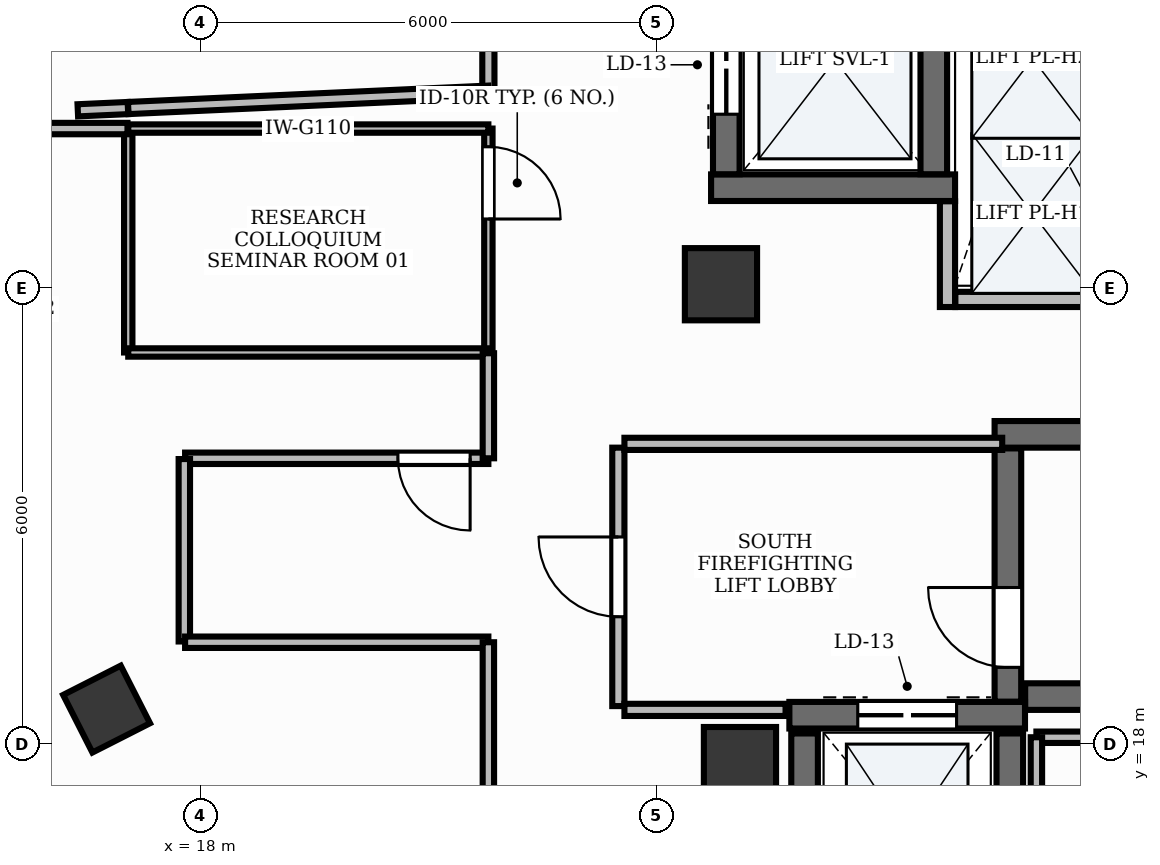
"""IFC4 building model, lengths in metres.
Left out: names, types, materials, properties, quantities, classifications, styles, units other than length and angle.
Written with IfcOpenShell. Run it as: python <this file> out.ifc"""

import sys

from ifc_helpers import new_model, si_unit, direction, frame, frame_2d, origin, origin_2d, place, context, subcontext, project, spatial, rectangle, extrude, element, fill, save


model = new_model("IFC4")
c1 = context("Model", 3, precision=1e-05, world=origin(), true_north=direction((0.0, 1.0)))
c2 = subcontext(c1, "Body", "Model", "MODEL_VIEW")
j1 = project(units=[si_unit("LENGTHUNIT", "METRE"), si_unit("PLANEANGLEUNIT", "RADIAN")], contexts=[c1])
p1 = place(None, origin())
s1 = spatial("IfcSite", under=j1, at=p1, CompositionType="ELEMENT")
p2 = place(p1, origin())
s2 = spatial("IfcBuilding", under=s1, at=p2, CompositionType="ELEMENT")
p3 = place(p2, frame((0.0, 0.0, 310.2)))
s3 = spatial("IfcBuildingStorey", under=s2, at=p3, CompositionType="ELEMENT", Elevation=310.2)
p4 = place(p3, frame((28.852, 18.625, 0.0), z_axis=(0.0, 0.0, 1.0), x_axis=(1.0, 0.0, 0.0)))
e1 = element("IfcWall", 1, at=p4, inside=s3, PredefinedType="SHEAR", context=c2, shape_type="SweptSolid", body=[
    extrude(rectangle(XDim=8.148, YDim=0.35, at=frame_2d((4.074, 0.0))), origin(), (0.0, 0.0, 1.0), 3.9),
])
p5 = place(p3, frame((28.45, 22.075, 0.0), z_axis=(0.0, 0.0, 1.0), x_axis=(1.0, 0.0, 0.0)))
e2 = element("IfcWall", 2, at=p5, inside=s3, PredefinedType="SHEAR", context=c2, shape_type="SweptSolid", body=[
    extrude(rectangle(XDim=8.55, YDim=0.35, at=frame_2d((4.275, 0.0))), origin(), (0.0, 0.0, 1.0), 3.9),
])
p6 = place(p3, frame((28.625, 18.557, 0.0), z_axis=(0.0, 0.0, 1.0), x_axis=(0.0, 1.0, 0.0)))
e3 = element("IfcWall", 3, at=p6, inside=s3, PredefinedType="SHEAR", context=c2, shape_type="SweptSolid", body=[
    extrude(rectangle(XDim=3.333, YDim=0.35, at=frame_2d((1.667, 0.0))), origin(), (0.0, 0.0, 1.0), 3.9),
])
p7 = place(p6, frame((0.453, 0.0, 0.0)))
e4 = element("IfcOpeningElement", 4, at=p7, cuts=e3, PredefinedType="OPENING", context=c2, shape_type="SweptSolid", body=[
    extrude(rectangle(XDim=1.05, YDim=2.15, at=frame_2d((0.525, 1.075))), frame((0.0, 0.19, 0.0), z_axis=(0.0, -1.0, 0.0), x_axis=(1.0, 0.0, 0.0)), (0.0, 0.0, 1.0), 0.38),
])
p8 = place(p3, frame((25.75, 18.38, 0.0), z_axis=(0.0, 0.0, 1.0), x_axis=(1.0, 0.0, 0.0)))
e5 = element("IfcWall", 5, at=p8, inside=s3, PredefinedType="SHEAR", context=c2, shape_type="SweptSolid", body=[
    extrude(rectangle(XDim=3.1, YDim=0.35, at=frame_2d((1.55, 0.0))), origin(), (0.0, 0.0, 1.0), 3.9),
])
p9 = place(p8, frame((0.9, 0.0, 0.0)))
e6 = element("IfcOpeningElement", 6, at=p9, cuts=e5, PredefinedType="OPENING", context=c2, shape_type="SweptSolid", body=[
    extrude(rectangle(XDim=1.3, YDim=2.2, at=frame_2d((0.65, 1.1))), frame((0.0, 0.19, 0.0), z_axis=(0.0, -1.0, 0.0), x_axis=(1.0, 0.0, 0.0)), (0.0, 0.0, 1.0), 0.38),
])
for number, where, z_axis, x_axis in (
    (7, (25.95, 15.44, 0.0), (0.0, 0.0, 1.0), (0.0, 1.0, 0.0)),
    (8, (28.65, 15.44, 0.0), (0.0, 0.0, 1.0), (0.0, 1.0, 0.0)),
):
    element("IfcWall", number, at=place(p3, frame(where, z_axis=z_axis, x_axis=x_axis)), inside=s3, PredefinedType="SHEAR", context=c2, shape_type="SweptSolid", body=[
        extrude(rectangle(XDim=2.7, YDim=0.35, at=frame_2d((1.35, 0.0))), origin(), (0.0, 0.0, 1.0), 3.9),
    ])
p10 = place(p3, frame((24.72, 25.32, 0.0), z_axis=(0.0, 0.0, 1.0), x_axis=(1.0, 0.0, 0.0)))
e9 = element("IfcWall", 9, at=p10, inside=s3, PredefinedType="SHEAR", context=c2, shape_type="SweptSolid", body=[
    extrude(rectangle(XDim=3.21, YDim=0.35, at=frame_2d((1.605, 0.0))), origin(), (0.0, 0.0, 1.0), 3.9),
])
p11 = place(p3, frame((24.92, 25.497, 0.0), z_axis=(0.0, 0.0, 1.0), x_axis=(0.0, 1.0, 0.0)))
e10 = element("IfcWall", 10, at=p11, inside=s3, PredefinedType="SHEAR", context=c2, shape_type="SweptSolid", body=[
    extrude(rectangle(XDim=3.006, YDim=0.35, at=frame_2d((1.503, 0.0))), origin(), (0.0, 0.0, 1.0), 3.9),
])
p12 = place(p11, frame((0.79, 0.0, 0.0)))
e11 = element("IfcOpeningElement", 11, at=p12, cuts=e10, PredefinedType="OPENING", context=c2, shape_type="SweptSolid", body=[
    extrude(rectangle(XDim=1.3, YDim=2.2, at=frame_2d((0.65, 1.1))), frame((0.0, 0.19, 0.0), z_axis=(0.0, -1.0, 0.0), x_axis=(1.0, 0.0, 0.0)), (0.0, 0.0, 1.0), 0.38),
])
p13 = place(p3, frame((27.65, 25.497, 0.0), z_axis=(0.0, 0.0, 1.0), x_axis=(0.0, 1.0, 0.0)))
e12 = element("IfcWall", 12, at=p13, inside=s3, PredefinedType="SHEAR", context=c2, shape_type="SweptSolid", body=[
    extrude(rectangle(XDim=3.006, YDim=0.35, at=frame_2d((1.503, 0.0))), origin(), (0.0, 0.0, 1.0), 3.9),
])
for number, where, z_axis, x_axis in (
    (13, (24.85, 24.05, -0.0), (0.0, 0.0, 1.0), (1.0, 0.0, 0.0)),
    (14, (25.1, 17.75, -0.0), (0.0, 0.0, 1.0), (1.0, 0.0, 0.0)),
):
    element("IfcColumn", number, at=place(p3, frame(where, z_axis=z_axis, x_axis=x_axis)), inside=s3, PredefinedType="PILASTER", context=c2, shape_type="SweptSolid", body=[
        extrude(rectangle(XDim=0.95, YDim=0.95, at=origin_2d()), origin(), (0.0, 0.0, 1.0), 3.901),
    ])
p14 = place(p3, frame((16.767, 18.46, -0.0), z_axis=(0.0, 0.0, 1.0), x_axis=(-0.453057191132, 0.891481453292, 0.0)))
e15 = element("IfcColumn", 15, at=p14, inside=s3, PredefinedType="COLUMN", context=c2, shape_type="SweptSolid", body=[
    extrude(rectangle(XDim=0.85, YDim=0.85, at=origin_2d()), origin(), (0.0, 0.0, 1.0), 3.901),
])
p15 = place(p3, frame((13.598, 20.73, 0.0), z_axis=(0.0, 0.0, 1.0), x_axis=(0.546723072071, -0.837313491152, 0.0)))
e16 = element("IfcWall", 16, at=p15, inside=s3, PredefinedType="STANDARD", context=c2, shape_type="SweptSolid", body=[
    extrude(rectangle(XDim=4.775, YDim=0.3, at=frame_2d((2.388, 0.0))), origin(), (0.0, 0.0, 1.0), 3.9),
])
p16 = place(p3, frame((27.83, 23.75, 0.0), z_axis=(0.0, 0.0, 1.0), x_axis=(0.0, 1.0, 0.0)))
e17 = element("IfcWall", 17, at=p16, inside=s3, PredefinedType="PARTITIONING", context=c2, shape_type="SweptSolid", body=[
    extrude(rectangle(XDim=1.391, YDim=0.2, at=frame_2d((0.696, 0.0))), origin(), (0.0, 0.0, 1.0), 2.91),
])
p17 = place(p3, frame((27.934, 23.85, 0.0), z_axis=(0.0, 0.0, 1.0), x_axis=(1.0, 0.0, 0.0)))
e18 = element("IfcWall", 18, at=p17, inside=s3, PredefinedType="PARTITIONING", context=c2, shape_type="SweptSolid", body=[
    extrude(rectangle(XDim=2.096, YDim=0.2, at=frame_2d((1.048, 0.0))), origin(), (0.0, 0.0, 1.0), 2.91),
])
p18 = place(p3, frame((23.5, 18.5, 0.0), z_axis=(0.0, 0.0, 1.0), x_axis=(0.0, 1.0, 0.0)))
e19 = element("IfcWall", 19, at=p18, inside=s3, PredefinedType="PARTITIONING", context=c2, shape_type="SweptSolid", body=[
    extrude(rectangle(XDim=3.4, YDim=0.16, at=frame_2d((1.7, 0.0))), origin(), (0.0, 0.0, 1.0), 2.91),
])
p19 = place(p18, frame((1.175, 0.0, 0.0)))
e20 = element("IfcOpeningElement", 20, at=p19, cuts=e19, PredefinedType="OPENING", context=c2, shape_type="SweptSolid", body=[
    extrude(rectangle(XDim=1.05, YDim=2.15, at=frame_2d((0.525, 1.075))), frame((0.0, 0.095, 0.0), z_axis=(0.0, -1.0, 0.0), x_axis=(1.0, 0.0, 0.0)), (0.0, 0.0, 1.0), 0.19),
])
p20 = place(p3, frame((23.58, 21.95, 0.0), z_axis=(0.0, 0.0, 1.0), x_axis=(1.0, 0.0, 0.0)))
e21 = element("IfcWall", 21, at=p20, inside=s3, PredefinedType="PARTITIONING", context=c2, shape_type="SweptSolid", body=[
    extrude(rectangle(XDim=4.97, YDim=0.16, at=frame_2d((2.485, 0.0))), origin(), (0.0, 0.0, 1.0), 2.91),
])
p21 = place(p3, frame((23.58, 18.45, 0.0), z_axis=(0.0, 0.0, 1.0), x_axis=(1.0, 0.0, 0.0)))
e22 = element("IfcWall", 22, at=p21, inside=s3, PredefinedType="PARTITIONING", context=c2, shape_type="SweptSolid", body=[
    extrude(rectangle(XDim=2.12, YDim=0.16, at=frame_2d((1.06, 0.0))), origin(), (0.0, 0.0, 1.0), 2.91),
])
p22 = place(p3, frame((21.79, 26.098, 0.0), z_axis=(0.0, 0.0, 1.0), x_axis=(0.0, -1.0, 0.0)))
e23 = element("IfcWall", 23, at=p22, inside=s3, PredefinedType="MOVABLE", context=c2, shape_type="SweptSolid", body=[
    extrude(rectangle(XDim=2.946, YDim=0.11, at=frame_2d((1.473, 0.0))), origin(), (0.0, 0.0, 1.0), 2.91),
])
p23 = place(p22, frame((0.24, 0.0, 0.0)))
e24 = element("IfcOpeningElement", 24, at=p23, cuts=e23, PredefinedType="OPENING", context=c2, shape_type="SweptSolid", body=[
    extrude(rectangle(XDim=0.95, YDim=2.15, at=frame_2d((0.475, 1.075))), frame((0.0, 0.07, 0.0), z_axis=(0.0, -1.0, 0.0), x_axis=(1.0, 0.0, 0.0)), (0.0, 0.0, 1.0), 0.14),
])
p24 = place(p3, frame((21.79, 21.76, 0.0), z_axis=(0.0, 0.0, 1.0), x_axis=(-1.0, 0.0, 0.0)))
e25 = element("IfcWall", 25, at=p24, inside=s3, PredefinedType="PARTITIONING", context=c2, shape_type="SweptSolid", body=[
    extrude(rectangle(XDim=3.99, YDim=0.15, at=frame_2d((1.995, 0.0))), origin(), (0.0, 0.0, 1.0), 2.91),
])
p25 = place(p24, frame((0.24, 0.0, 0.0)))
e26 = element("IfcOpeningElement", 26, at=p25, cuts=e25, PredefinedType="OPENING", context=c2, shape_type="SweptSolid", body=[
    extrude(rectangle(XDim=0.95, YDim=2.15, at=frame_2d((0.475, 1.075))), frame((0.0, 0.09, 0.0), z_axis=(0.0, -1.0, 0.0), x_axis=(1.0, 0.0, 0.0)), (0.0, 0.0, 1.0), 0.18),
])
p26 = place(p3, frame((17.052, 23.152, 0.0), z_axis=(0.0, 0.0, 1.0), x_axis=(0.0, 1.0, 0.0)))
e27 = element("IfcWall", 27, at=p26, inside=s3, PredefinedType="MOVABLE", context=c2, shape_type="SweptSolid", body=[
    extrude(rectangle(XDim=2.946, YDim=0.11, at=frame_2d((1.473, 0.0))), origin(), (0.0, 0.0, 1.0), 2.91),
])
for number, where, z_axis, x_axis in (
    (28, (17.052, 26.098, 0.0), (0.0, 0.0, 1.0), (1.0, 0.0, 0.0)),
    (29, (21.79, 23.152, 0.0), (0.0, 0.0, 1.0), (-1.0, 0.0, 0.0)),
):
    element("IfcWall", number, at=place(p3, frame(where, z_axis=z_axis, x_axis=x_axis)), inside=s3, PredefinedType="MOVABLE", context=c2, shape_type="SweptSolid", body=[
        extrude(rectangle(XDim=4.738, YDim=0.11, at=frame_2d((2.369, 0.0))), origin(), (0.0, 0.0, 1.0), 2.91),
    ])
p27 = place(p3, frame((12.15, 26.098, 0.0), z_axis=(0.0, 0.0, 1.0), x_axis=(1.0, 0.0, 0.0)))
e30 = element("IfcWall", 30, at=p27, inside=s3, PredefinedType="PARTITIONING", context=c2, shape_type="SweptSolid", body=[
    extrude(rectangle(XDim=4.892, YDim=0.15, at=frame_2d((2.446, 0.0))), origin(), (0.0, 0.0, 1.0), 2.91),
])
p28 = place(p3, frame((21.79, 23.142, 0.0), z_axis=(0.0, 0.0, 1.0), x_axis=(0.0, -1.0, 0.0)))
e31 = element("IfcWall", 31, at=p28, inside=s3, PredefinedType="PARTITIONING", context=c2, shape_type="SweptSolid", body=[
    extrude(rectangle(XDim=1.382, YDim=0.15, at=frame_2d((0.691, 0.0))), origin(), (0.0, 0.0, 1.0), 2.91),
])
p29 = place(p3, frame((17.79, 21.75, 0.0), z_axis=(0.0, 0.0, 1.0), x_axis=(0.0, -1.0, 0.0)))
e32 = element("IfcWall", 32, at=p29, inside=s3, PredefinedType="PARTITIONING", context=c2, shape_type="SweptSolid", body=[
    extrude(rectangle(XDim=2.4, YDim=0.15, at=frame_2d((1.2, 0.0))), origin(), (0.0, 0.0, 1.0), 2.91),
])
p30 = place(p3, frame((17.8, 19.34, 0.0), z_axis=(0.0, 0.0, 1.0), x_axis=(1.0, 0.0, 0.0)))
e33 = element("IfcWall", 33, at=p30, inside=s3, PredefinedType="PARTITIONING", context=c2, shape_type="SweptSolid", body=[
    extrude(rectangle(XDim=3.99, YDim=0.15, at=frame_2d((1.995, 0.0))), origin(), (0.0, 0.0, 1.0), 2.91),
])
p31 = place(p3, frame((21.79, 19.34, 0.0), z_axis=(0.0, 0.0, 1.0), x_axis=(0.0, -1.0, 0.0)))
e34 = element("IfcWall", 34, at=p31, inside=s3, PredefinedType="PARTITIONING", context=c2, shape_type="SweptSolid", body=[
    extrude(rectangle(XDim=5.94, YDim=0.15, at=frame_2d((2.97, 0.0))), origin(), (0.0, 0.0, 1.0), 2.91),
])
p32 = place(p3, frame((29.0, 18.09, 0.0), z_axis=(0.0, 0.0, 1.0), x_axis=(1.0, 0.0, 0.0)))
e35 = element("IfcWall", 35, at=p32, inside=s3, PredefinedType="PARTITIONING", context=c2, shape_type="SweptSolid", body=[
    extrude(rectangle(XDim=7.839, YDim=0.15, at=frame_2d((3.919, 0.0))), origin(), (0.0, 0.0, 1.0), 2.91),
])
p33 = place(p3, frame((29.0, 15.86, 0.0), z_axis=(0.0, 0.0, 1.0), x_axis=(0.0, 1.0, 0.0)))
e36 = element("IfcWall", 36, at=p33, inside=s3, PredefinedType="PARTITIONING", context=c2, shape_type="SweptSolid", body=[
    extrude(rectangle(XDim=2.23, YDim=0.15, at=frame_2d((1.115, 0.0))), origin(), (0.0, 0.0, 1.0), 2.91),
])
p34 = place(p3, frame((21.79, 27.59, 0.0), z_axis=(0.0, 0.0, 1.0), x_axis=(0.0, -1.0, 0.0)))
e37 = element("IfcWall", 37, at=p34, inside=s3, PredefinedType="PARTITIONING", context=c2, shape_type="SweptSolid", body=[
    extrude(rectangle(XDim=1.007, YDim=0.16, at=frame_2d((0.503, 0.0))), origin(), (0.0, 0.0, 1.0), 2.91),
])
p35 = place(p3, frame((21.79, 26.583, 0.0), z_axis=(0.0, 0.0, 1.0), x_axis=(-0.998971085975, -0.045351619434, 0.0)))
e38 = element("IfcWall", 38, at=p35, inside=s3, PredefinedType="PARTITIONING", context=c2, shape_type="SweptSolid", body=[
    extrude(rectangle(XDim=4.743, YDim=0.16, at=frame_2d((2.371, 0.0))), origin(), (0.0, 0.0, 1.0), 2.91),
])
p36 = place(p3, frame((17.048, 26.368, 0.0), z_axis=(0.0, 0.0, 1.0), x_axis=(-0.998964723802, -0.045491544253, 0.0)))
e39 = element("IfcWall", 39, at=p36, inside=s3, PredefinedType="PARTITIONING", context=c2, shape_type="SweptSolid", body=[
    extrude(rectangle(XDim=0.66, YDim=0.16, at=frame_2d((0.33, 0.0))), origin(), (0.0, 0.0, 1.0), 2.91),
])
p37 = place(p7, origin())
e40 = element("IfcDoor", 40, at=p37, inside=s3, OperationType="SINGLE_SWING_RIGHT", PredefinedType="DOOR", context=c2, shape_type="SweptSolid", body=[
    extrude(rectangle(XDim=1.05, YDim=2.15, at=frame_2d((0.525, 1.075))), frame((0.0, 0.025, 0.0), z_axis=(0.0, -1.0, 0.0), x_axis=(1.0, 0.0, 0.0)), (0.0, 0.0, 1.0), 0.05),
])
fill(e4, e40)
p38 = place(p9, origin())
e41 = element("IfcDoor", 41, at=p38, inside=s3, OperationType="DOUBLE_DOOR_SLIDING", PredefinedType="DOOR", context=c2, shape_type="SweptSolid", body=[
    extrude(rectangle(XDim=1.3, YDim=2.2, at=frame_2d((0.65, 1.1))), frame((0.0, 0.025, 0.0), z_axis=(0.0, -1.0, 0.0), x_axis=(1.0, 0.0, 0.0)), (0.0, 0.0, 1.0), 0.05),
])
fill(e6, e41)
p39 = place(p12, origin())
e42 = element("IfcDoor", 42, at=p39, inside=s3, OperationType="DOUBLE_DOOR_SLIDING", PredefinedType="DOOR", context=c2, shape_type="SweptSolid", body=[
    extrude(rectangle(XDim=1.3, YDim=2.2, at=frame_2d((0.65, 1.1))), frame((0.0, 0.025, 0.0), z_axis=(0.0, -1.0, 0.0), x_axis=(1.0, 0.0, 0.0)), (0.0, 0.0, 1.0), 0.05),
])
fill(e11, e42)
p40 = place(p19, origin())
e43 = element("IfcDoor", 43, at=p40, inside=s3, OperationType="SINGLE_SWING_RIGHT", PredefinedType="DOOR", context=c2, shape_type="SweptSolid", body=[
    extrude(rectangle(XDim=1.05, YDim=2.15, at=frame_2d((0.525, 1.075))), frame((0.0, 0.025, 0.0), z_axis=(0.0, -1.0, 0.0), x_axis=(1.0, 0.0, 0.0)), (0.0, 0.0, 1.0), 0.05),
])
fill(e20, e43)
p41 = place(p23, origin())
e44 = element("IfcDoor", 44, at=p41, inside=s3, OperationType="SINGLE_SWING_RIGHT", PredefinedType="DOOR", context=c2, shape_type="SweptSolid", body=[
    extrude(rectangle(XDim=0.95, YDim=2.15, at=frame_2d((0.475, 1.075))), frame((0.0, 0.025, 0.0), z_axis=(0.0, -1.0, 0.0), x_axis=(1.0, 0.0, 0.0)), (0.0, 0.0, 1.0), 0.05),
])
fill(e24, e44)
p42 = place(p25, origin())
e45 = element("IfcDoor", 45, at=p42, inside=s3, OperationType="SINGLE_SWING_LEFT", PredefinedType="DOOR", context=c2, shape_type="SweptSolid", body=[
    extrude(rectangle(XDim=0.95, YDim=2.15, at=frame_2d((0.475, 1.075))), frame((0.0, 0.025, 0.0), z_axis=(0.0, -1.0, 0.0), x_axis=(1.0, 0.0, 0.0)), (0.0, 0.0, 1.0), 0.05),
])
fill(e26, e45)
save(model, sys.argv[1])
